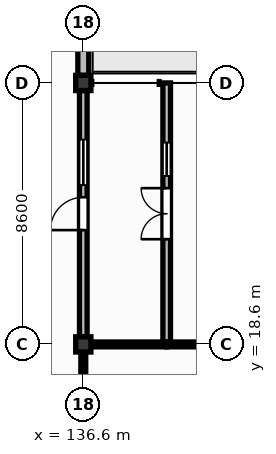
"""IFC4 building model, lengths in metres.
Left out: names, types, materials, properties, quantities, classifications, styles, units other than length and angle.
Written with IfcOpenShell. Run it as: python <this file> out.ifc"""

import sys

from ifc_helpers import new_model, si_unit, direction, frame, frame_2d, origin, origin_2d, place, context, subcontext, project, spatial, rectangle, extrude, element, fill, save


model = new_model("IFC4")
c1 = context("Model", 3, precision=1e-05, world=origin(), true_north=direction((0.0, 1.0)))
c2 = subcontext(c1, "Body", "Model", "MODEL_VIEW")
j1 = project(units=[si_unit("LENGTHUNIT", "METRE"), si_unit("PLANEANGLEUNIT", "RADIAN")], contexts=[c1])
p1 = place(None, origin())
s1 = spatial("IfcSite", under=j1, at=p1, CompositionType="ELEMENT")
p2 = place(p1, origin())
s2 = spatial("IfcBuilding", under=s1, at=p2, CompositionType="ELEMENT")
p3 = place(p2, frame((0.0, 0.0, 4.5)))
s3 = spatial("IfcBuildingStorey", under=s2, at=p3, CompositionType="ELEMENT", Elevation=4.5)
for number, where, z_axis, x_axis in (
    (1, (136.6, 18.6, 0.0), (0.0, 0.0, 1.0), (1.0, 0.0, 0.0)),
    (2, (136.6, 27.2, 0.0), (0.0, 0.0, 1.0), (1.0, 0.0, 0.0)),
):
    element("IfcColumn", number, at=place(p3, frame(where, z_axis=z_axis, x_axis=x_axis)), inside=s3, PredefinedType="COLUMN", context=c2, shape_type="SweptSolid", body=[
        extrude(rectangle(XDim=0.5, YDim=0.5, at=origin_2d()), origin(), (0.0, 0.0, 1.0), 4.22),
    ])
p4 = place(p3, frame((136.6, 27.45, 0.0), z_axis=(0.0, 0.0, 1.0), x_axis=(0.0, 1.0, 0.0)))
e3 = element("IfcWall", 3, at=p4, inside=s3, PredefinedType="SOLIDWALL", context=c2, shape_type="SweptSolid", body=[
    extrude(rectangle(XDim=9.1, YDim=0.36, at=frame_2d((4.55, 0.0))), origin(), (0.0, 0.0, 1.0), 3.52),
])
p5 = place(p4, frame((3.45, 0.0, 0.0)))
e4 = element("IfcOpeningElement", 4, at=p5, cuts=e3, PredefinedType="OPENING", context=c2, shape_type="SweptSolid", body=[
    extrude(rectangle(XDim=2.2, YDim=2.5, at=frame_2d((1.1, 1.25))), frame((0.0, 0.19, 0.0), z_axis=(0.0, -1.0, 0.0), x_axis=(1.0, 0.0, 0.0)), (0.0, 0.0, 1.0), 0.38),
])
p6 = place(p4, frame((0.915, 0.0, 1.5)))
e5 = element("IfcOpeningElement", 5, at=p6, cuts=e3, PredefinedType="OPENING", context=c2, shape_type="SweptSolid", body=[
    extrude(rectangle(XDim=1.68, YDim=1.25, at=frame_2d((0.84, 0.625))), frame((0.0, 0.19, 0.0), z_axis=(0.0, -1.0, 0.0), x_axis=(1.0, 0.0, 0.0)), (0.0, 0.0, 1.0), 0.38),
])
p7 = place(p4, frame((6.42, 0.0, 1.5)))
e6 = element("IfcOpeningElement", 6, at=p7, cuts=e3, PredefinedType="OPENING", context=c2, shape_type="SweptSolid", body=[
    extrude(rectangle(XDim=1.85, YDim=1.25, at=frame_2d((0.925, 0.625))), frame((0.0, 0.19, 0.0), z_axis=(0.0, -1.0, 0.0), x_axis=(1.0, 0.0, 0.0)), (0.0, 0.0, 1.0), 0.38),
])
p8 = place(p3, frame((136.6, 18.85, 0.0), z_axis=(0.0, 0.0, 1.0), x_axis=(0.0, 1.0, 0.0)))
e7 = element("IfcWall", 7, at=p8, inside=s3, PredefinedType="SOLIDWALL", context=c2, shape_type="SweptSolid", body=[
    extrude(rectangle(XDim=8.1, YDim=0.25, at=frame_2d((4.05, 0.0))), origin(), (0.0, 0.0, 1.0), 3.52),
])
p9 = place(p8, frame((3.51, 0.0, 0.0)))
e8 = element("IfcOpeningElement", 8, at=p9, cuts=e7, PredefinedType="OPENING", context=c2, shape_type="SweptSolid", body=[
    extrude(rectangle(XDim=1.08, YDim=2.15, at=frame_2d((0.54, 1.075))), frame((0.0, 0.135, 0.0), z_axis=(0.0, -1.0, 0.0), x_axis=(1.0, 0.0, 0.0)), (0.0, 0.0, 1.0), 0.27),
])
p10 = place(p8, frame((4.99, 0.0, 1.1)))
e9 = element("IfcOpeningElement", 9, at=p10, cuts=e7, PredefinedType="OPENING", context=c2, shape_type="SweptSolid", body=[
    extrude(rectangle(XDim=1.5, YDim=1.0, at=frame_2d((0.75, 0.5))), frame((0.0, 0.135, 0.0), z_axis=(0.0, -1.0, 0.0), x_axis=(1.0, 0.0, 0.0)), (0.0, 0.0, 1.0), 0.27),
])
p11 = place(p3, frame((139.343, 18.6, 0.0), z_axis=(0.0, 0.0, 1.0), x_axis=(0.0, 1.0, 0.0)))
e10 = element("IfcWall", 10, at=p11, inside=s3, PredefinedType="SOLIDWALL", context=c2, shape_type="SweptSolid", body=[
    extrude(rectangle(XDim=8.6, YDim=0.25, at=frame_2d((4.3, 0.0))), origin(), (0.0, 0.0, 1.0), 4.18),
])
p12 = place(p11, frame((3.46, 0.0, 0.0)))
e11 = element("IfcOpeningElement", 11, at=p12, cuts=e10, PredefinedType="OPENING", context=c2, shape_type="SweptSolid", body=[
    extrude(rectangle(XDim=1.68, YDim=2.3, at=frame_2d((0.84, 1.15))), frame((0.0, 0.135, 0.0), z_axis=(0.0, -1.0, 0.0), x_axis=(1.0, 0.0, 0.0)), (0.0, 0.0, 1.0), 0.27),
])
p13 = place(p11, frame((5.54, 0.0, 1.1)))
e12 = element("IfcOpeningElement", 12, at=p13, cuts=e10, PredefinedType="OPENING", context=c2, shape_type="SweptSolid", body=[
    extrude(rectangle(XDim=1.1, YDim=1.05, at=frame_2d((0.55, 0.525))), frame((0.0, 0.135, 0.0), z_axis=(0.0, -1.0, 0.0), x_axis=(1.0, 0.0, 0.0)), (0.0, 0.0, 1.0), 0.27),
])
p14 = place(p3, frame((136.6, 16.47, 0.0), z_axis=(0.0, 0.0, 1.0), x_axis=(0.0, 1.0, 0.0)))
e13 = element("IfcWall", 13, at=p14, inside=s3, PredefinedType="PARTITIONING", context=c2, shape_type="SweptSolid", body=[
    extrude(rectangle(XDim=1.88, YDim=0.16, at=frame_2d((0.94, 0.0))), origin(), (0.0, 0.0, 1.0), 3.52),
])
p15 = place(p3, frame((136.85, 18.6, 0.0), z_axis=(0.0, 0.0, 1.0), x_axis=(1.0, 0.0, 0.0)))
e14 = element("IfcWall", 14, at=p15, inside=s3, PredefinedType="PARTITIONING", context=c2, shape_type="SweptSolid", body=[
    extrude(rectangle(XDim=2.493, YDim=0.16, at=frame_2d((1.247, 0.0))), origin(), (0.0, 0.0, 1.0), 3.52),
])
p16 = place(p3, frame((139.343, 18.6, 0.0), z_axis=(0.0, 0.0, 1.0), x_axis=(1.0, 0.0, 0.0)))
e15 = element("IfcWall", 15, at=p16, inside=s3, PredefinedType="PARTITIONING", context=c2, shape_type="SweptSolid", body=[
    extrude(rectangle(XDim=4.207, YDim=0.16, at=frame_2d((2.104, 0.0))), origin(), (0.0, 0.0, 1.0), 3.52),
])
p17 = place(p9, origin())
e16 = element("IfcDoor", 16, at=p17, inside=s3, OperationType="SINGLE_SWING_LEFT", PredefinedType="DOOR", context=c2, shape_type="SweptSolid", body=[
    extrude(rectangle(XDim=1.08, YDim=2.15, at=frame_2d((0.54, 1.075))), frame((0.0, 0.025, 0.0), z_axis=(0.0, -1.0, 0.0), x_axis=(1.0, 0.0, 0.0)), (0.0, 0.0, 1.0), 0.05),
])
fill(e8, e16)
p18 = place(p10, origin())
e17 = element("IfcWindow", 17, at=p18, inside=s3, PartitioningType="SINGLE_PANEL", PredefinedType="WINDOW", context=c2, shape_type="SweptSolid", body=[
    extrude(rectangle(XDim=1.5, YDim=1.0, at=frame_2d((0.75, 0.5))), frame((0.0, 0.03, 0.0), z_axis=(0.0, -1.0, 0.0), x_axis=(1.0, 0.0, 0.0)), (0.0, 0.0, 1.0), 0.06),
])
fill(e9, e17)
p19 = place(p12, origin())
e18 = element("IfcDoor", 18, at=p19, inside=s3, OperationType="DOUBLE_DOOR_SINGLE_SWING", PredefinedType="DOOR", context=c2, shape_type="SweptSolid", body=[
    extrude(rectangle(XDim=1.68, YDim=2.3, at=frame_2d((0.84, 1.15))), frame((0.0, 0.025, 0.0), z_axis=(0.0, -1.0, 0.0), x_axis=(1.0, 0.0, 0.0)), (0.0, 0.0, 1.0), 0.05),
])
fill(e11, e18)
p20 = place(p13, origin())
e19 = element("IfcWindow", 19, at=p20, inside=s3, PartitioningType="SINGLE_PANEL", PredefinedType="WINDOW", context=c2, shape_type="SweptSolid", body=[
    extrude(rectangle(XDim=1.1, YDim=1.05, at=frame_2d((0.55, 0.525))), frame((0.0, 0.03, 0.0), z_axis=(0.0, -1.0, 0.0), x_axis=(1.0, 0.0, 0.0)), (0.0, 0.0, 1.0), 0.06),
])
fill(e12, e19)
save(model, sys.argv[1])
